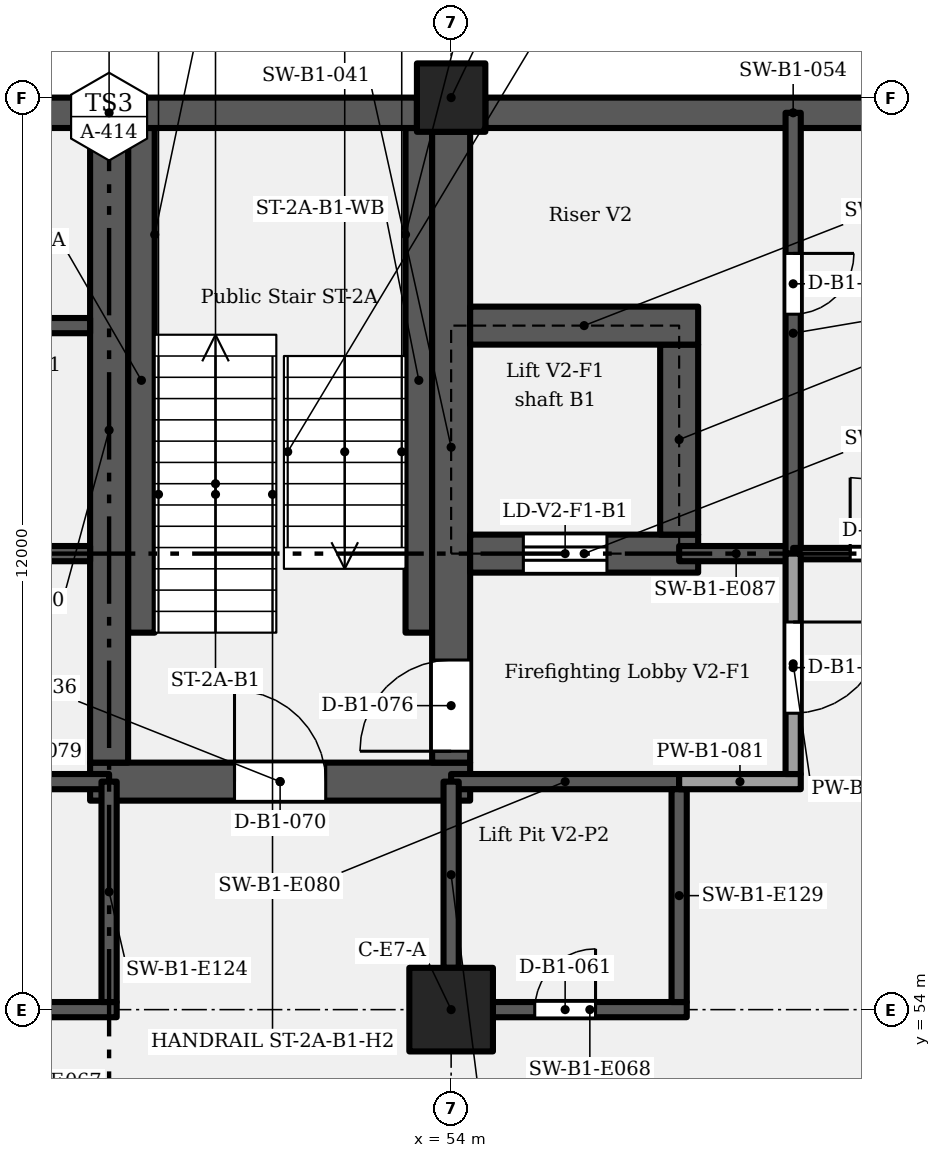
"""IFC4 building model, lengths in metres.
Left out: names, types, materials, properties, quantities, classifications, styles, units other than length and angle.
Written with IfcOpenShell. Run it as: python <this file> out.ifc"""

import sys

from ifc_helpers import new_model, si_unit, direction, frame, frame_2d, origin, origin_2d, place, context, subcontext, project, spatial, rectangle, extrude, element, fill, save


model = new_model("IFC4")
c1 = context("Model", 3, precision=1e-05, world=origin(), true_north=direction((0.0, 1.0)))
c2 = subcontext(c1, "Body", "Model", "MODEL_VIEW")
j1 = project(units=[si_unit("LENGTHUNIT", "METRE"), si_unit("PLANEANGLEUNIT", "RADIAN")], contexts=[c1])
p1 = place(None, origin())
s1 = spatial("IfcSite", under=j1, at=p1, CompositionType="ELEMENT")
p2 = place(p1, origin())
s2 = spatial("IfcBuilding", under=s1, at=p2, CompositionType="ELEMENT")
p3 = place(p2, frame((0.0, 0.0, -4.2)))
s3 = spatial("IfcBuildingStorey", under=s2, at=p3, CompositionType="ELEMENT", Elevation=-4.2)
p4 = place(p3, frame((54.0, 54.0, 0.0), z_axis=(0.0, 0.0, 1.0), x_axis=(1.0, 0.0, 0.0)))
e1 = element("IfcColumn", 1, at=p4, inside=s3, PredefinedType="COLUMN", context=c2, shape_type="SweptSolid", body=[
    extrude(rectangle(XDim=1.1, YDim=1.1, at=origin_2d()), origin(), (0.0, 0.0, 1.0), 4.2),
])
p5 = place(p3, frame((54.0, 66.0, 0.0), z_axis=(0.0, 0.0, 1.0), x_axis=(1.0, 0.0, 0.0)))
e2 = element("IfcColumn", 2, at=p5, inside=s3, PredefinedType="COLUMN", context=c2, shape_type="SweptSolid", body=[
    extrude(rectangle(XDim=0.9, YDim=0.9, at=origin_2d()), origin(), (0.0, 0.0, 1.0), 4.2),
])
p6 = place(p3, frame((49.25, 57.0, 0.0), z_axis=(0.0, 0.0, 1.0), x_axis=(1.0, 0.0, 0.0)))
e3 = element("IfcWall", 3, at=p6, inside=s3, PredefinedType="SHEAR", context=c2, shape_type="SweptSolid", body=[
    extrude(rectangle(XDim=5.0, YDim=0.5, at=frame_2d((2.5, 0.0))), origin(), (0.0, 0.0, 1.0), 3.9),
])
p7 = place(p6, frame((1.9, 0.0, 0.0)))
e4 = element("IfcOpeningElement", 4, at=p7, cuts=e3, PredefinedType="OPENING", context=c2, shape_type="SweptSolid", body=[
    extrude(rectangle(XDim=1.2, YDim=2.1, at=frame_2d((0.6, 1.05))), frame((0.0, 0.26, 0.0), z_axis=(0.0, -1.0, 0.0), x_axis=(1.0, 0.0, 0.0)), (0.0, 0.0, 1.0), 0.52),
])
p8 = place(p3, frame((49.5, 57.25, 0.0), z_axis=(0.0, 0.0, 1.0), x_axis=(0.0, 1.0, 0.0)))
e5 = element("IfcWall", 5, at=p8, inside=s3, PredefinedType="SHEAR", context=c2, shape_type="SweptSolid", body=[
    extrude(rectangle(XDim=8.75, YDim=0.5, at=frame_2d((4.375, 0.0))), origin(), (0.0, 0.0, 1.0), 3.9),
])
p9 = place(p3, frame((54.0, 57.25, 0.0), z_axis=(0.0, 0.0, 1.0), x_axis=(0.0, 1.0, 0.0)))
e6 = element("IfcWall", 6, at=p9, inside=s3, PredefinedType="SHEAR", context=c2, shape_type="SweptSolid", body=[
    extrude(rectangle(XDim=8.3, YDim=0.5, at=frame_2d((4.15, 0.0))), origin(), (0.0, 0.0, 1.0), 3.9),
])
p10 = place(p9, frame((0.15, 0.0, 0.0)))
e7 = element("IfcOpeningElement", 7, at=p10, cuts=e6, PredefinedType="OPENING", context=c2, shape_type="SweptSolid", body=[
    extrude(rectangle(XDim=1.2, YDim=2.1, at=frame_2d((0.6, 1.05))), frame((0.0, 0.26, 0.0), z_axis=(0.0, -1.0, 0.0), x_axis=(1.0, 0.0, 0.0)), (0.0, 0.0, 1.0), 0.52),
])
p11 = place(p3, frame((54.25, 60.0, 0.0), z_axis=(0.0, 0.0, 1.0), x_axis=(1.0, 0.0, 0.0)))
e8 = element("IfcWall", 8, at=p11, inside=s3, PredefinedType="SHEAR", context=c2, shape_type="SweptSolid", body=[
    extrude(rectangle(XDim=3.0, YDim=0.5, at=frame_2d((1.5, 0.0))), origin(), (0.0, 0.0, 1.0), 3.9),
])
p12 = place(p11, frame((0.7, 0.0, 0.0)))
e9 = element("IfcOpeningElement", 9, at=p12, cuts=e8, PredefinedType="OPENING", context=c2, shape_type="SweptSolid", body=[
    extrude(rectangle(XDim=1.1, YDim=2.1, at=frame_2d((0.55, 1.05))), frame((0.0, 0.26, 0.0), z_axis=(0.0, -1.0, 0.0), x_axis=(1.0, 0.0, 0.0)), (0.0, 0.0, 1.0), 0.52),
])
p13 = place(p3, frame((57.0, 60.25, 0.0), z_axis=(0.0, 0.0, 1.0), x_axis=(0.0, 1.0, 0.0)))
e10 = element("IfcWall", 10, at=p13, inside=s3, PredefinedType="SHEAR", context=c2, shape_type="SweptSolid", body=[
    extrude(rectangle(XDim=2.5, YDim=0.5, at=frame_2d((1.25, 0.0))), origin(), (0.0, 0.0, 1.0), 3.9),
])
p14 = place(p3, frame((54.25, 63.0, 0.0), z_axis=(0.0, 0.0, 1.0), x_axis=(1.0, 0.0, 0.0)))
e11 = element("IfcWall", 11, at=p14, inside=s3, PredefinedType="SHEAR", context=c2, shape_type="SweptSolid", body=[
    extrude(rectangle(XDim=3.0, YDim=0.5, at=frame_2d((1.5, 0.0))), origin(), (0.0, 0.0, 1.0), 3.9),
])
for number, where, z_axis, x_axis in (
    (12, (45.45, 65.8, 0.0), (0.0, 0.0, 1.0), (1.0, 0.0, 0.0)),
    (13, (54.45, 65.8, 0.0), (0.0, 0.0, 1.0), (1.0, 0.0, 0.0)),
):
    element("IfcWall", number, at=place(p3, frame(where, z_axis=z_axis, x_axis=x_axis)), inside=s3, PredefinedType="SOLIDWALL", context=c2, shape_type="SweptSolid", body=[
        extrude(rectangle(XDim=8.1, YDim=0.4, at=frame_2d((4.05, 0.0))), origin(), (0.0, 0.0, 1.0), 3.9),
    ])
p15 = place(p3, frame((46.5, 54.0, 0.0), z_axis=(0.0, 0.0, 1.0), x_axis=(1.0, 0.0, 0.0)))
e14 = element("IfcWall", 14, at=p15, inside=s3, PredefinedType="SHEAR", context=c2, shape_type="SweptSolid", body=[
    extrude(rectangle(XDim=3.1, YDim=0.2, at=frame_2d((1.55, 0.0))), origin(), (0.0, 0.0, 1.0), 3.9),
])
p16 = place(p15, frame((1.1, 0.0, 0.0)))
e15 = element("IfcOpeningElement", 15, at=p16, cuts=e14, PredefinedType="OPENING", context=c2, shape_type="SweptSolid", body=[
    extrude(rectangle(XDim=0.8, YDim=2.0, at=frame_2d((0.4, 1.0))), frame((0.0, 0.11, 0.0), z_axis=(0.0, -1.0, 0.0), x_axis=(1.0, 0.0, 0.0)), (0.0, 0.0, 1.0), 0.22),
])
p17 = place(p3, frame((54.55, 54.0, 0.0), z_axis=(0.0, 0.0, 1.0), x_axis=(1.0, 0.0, 0.0)))
e16 = element("IfcWall", 16, at=p17, inside=s3, PredefinedType="SHEAR", context=c2, shape_type="SweptSolid", body=[
    extrude(rectangle(XDim=2.55, YDim=0.2, at=frame_2d((1.275, 0.0))), origin(), (0.0, 0.0, 1.0), 3.9),
])
p18 = place(p17, frame((0.55, 0.0, 0.0)))
e17 = element("IfcOpeningElement", 17, at=p18, cuts=e16, PredefinedType="OPENING", context=c2, shape_type="SweptSolid", body=[
    extrude(rectangle(XDim=0.8, YDim=2.0, at=frame_2d((0.4, 1.0))), frame((0.0, 0.11, 0.0), z_axis=(0.0, -1.0, 0.0), x_axis=(1.0, 0.0, 0.0)), (0.0, 0.0, 1.0), 0.22),
])
p19 = place(p3, frame((46.4, 57.0, 0.0), z_axis=(0.0, 0.0, 1.0), x_axis=(1.0, 0.0, 0.0)))
e18 = element("IfcWall", 18, at=p19, inside=s3, PredefinedType="SHEAR", context=c2, shape_type="SweptSolid", body=[
    extrude(rectangle(XDim=3.1, YDim=0.2, at=frame_2d((1.55, 0.0))), origin(), (0.0, 0.0, 1.0), 3.9),
])
p20 = place(p3, frame((54.0, 57.0, 0.0), z_axis=(0.0, 0.0, 1.0), x_axis=(1.0, 0.0, 0.0)))
e19 = element("IfcWall", 19, at=p20, inside=s3, PredefinedType="SHEAR", context=c2, shape_type="SweptSolid", body=[
    extrude(rectangle(XDim=3.0, YDim=0.2, at=frame_2d((1.5, 0.0))), origin(), (0.0, 0.0, 1.0), 3.9),
])
p21 = place(p3, frame((57.0, 57.0, 0.0), z_axis=(0.0, 0.0, 1.0), x_axis=(1.0, 0.0, 0.0)))
e20 = element("IfcWall", 20, at=p21, inside=s3, PredefinedType="PARTITIONING", context=c2, shape_type="SweptSolid", body=[
    extrude(rectangle(XDim=1.6, YDim=0.2, at=frame_2d((0.8, 0.0))), origin(), (0.0, 0.0, 1.0), 3.2),
])
p22 = place(p3, frame((46.4, 60.0, 0.0), z_axis=(0.0, 0.0, 1.0), x_axis=(1.0, 0.0, 0.0)))
e21 = element("IfcWall", 21, at=p22, inside=s3, PredefinedType="SHEAR", context=c2, shape_type="SweptSolid", body=[
    extrude(rectangle(XDim=2.85, YDim=0.2, at=frame_2d((1.425, 0.0))), origin(), (0.0, 0.0, 1.0), 3.9),
])
p23 = place(p3, frame((57.0, 60.0, 0.0), z_axis=(0.0, 0.0, 1.0), x_axis=(1.0, 0.0, 0.0)))
e22 = element("IfcWall", 22, at=p23, inside=s3, PredefinedType="SHEAR", context=c2, shape_type="SweptSolid", body=[
    extrude(rectangle(XDim=1.5, YDim=0.2, at=frame_2d((0.75, 0.0))), origin(), (0.0, 0.0, 1.0), 3.9),
])
p24 = place(p3, frame((58.5, 60.0, 0.0), z_axis=(0.0, 0.0, 1.0), x_axis=(1.0, 0.0, 0.0)))
e23 = element("IfcWall", 23, at=p24, inside=s3, PredefinedType="PARTITIONING", context=c2, shape_type="SweptSolid", body=[
    extrude(rectangle(XDim=2.575, YDim=0.15, at=frame_2d((1.288, 0.0))), origin(), (0.0, 0.0, 1.0), 3.9),
])
p25 = place(p24, frame((0.75, 0.0, 0.0)))
e24 = element("IfcOpeningElement", 24, at=p25, cuts=e23, PredefinedType="OPENING", context=c2, shape_type="SweptSolid", body=[
    extrude(rectangle(XDim=1.0, YDim=2.1, at=frame_2d((0.5, 1.05))), frame((0.0, 0.085, 0.0), z_axis=(0.0, -1.0, 0.0), x_axis=(1.0, 0.0, 0.0)), (0.0, 0.0, 1.0), 0.17),
])
p26 = place(p3, frame((46.4, 63.0, 0.0), z_axis=(0.0, 0.0, 1.0), x_axis=(1.0, 0.0, 0.0)))
e25 = element("IfcWall", 25, at=p26, inside=s3, PredefinedType="SHEAR", context=c2, shape_type="SweptSolid", body=[
    extrude(rectangle(XDim=2.85, YDim=0.2, at=frame_2d((1.425, 0.0))), origin(), (0.0, 0.0, 1.0), 3.9),
])
p27 = place(p3, frame((49.5, 54.1, 0.0), z_axis=(0.0, 0.0, 1.0), x_axis=(0.0, 1.0, 0.0)))
e26 = element("IfcWall", 26, at=p27, inside=s3, PredefinedType="SHEAR", context=c2, shape_type="SweptSolid", body=[
    extrude(rectangle(XDim=2.9, YDim=0.2, at=frame_2d((1.45, 0.0))), origin(), (0.0, 0.0, 1.0), 3.9),
])
p28 = place(p3, frame((54.0, 54.55, 0.0), z_axis=(0.0, 0.0, 1.0), x_axis=(0.0, 1.0, 0.0)))
e27 = element("IfcWall", 27, at=p28, inside=s3, PredefinedType="SHEAR", context=c2, shape_type="SweptSolid", body=[
    extrude(rectangle(XDim=2.45, YDim=0.2, at=frame_2d((1.225, 0.0))), origin(), (0.0, 0.0, 1.0), 3.9),
])
p29 = place(p3, frame((57.0, 54.1, 0.0), z_axis=(0.0, 0.0, 1.0), x_axis=(0.0, 1.0, 0.0)))
e28 = element("IfcWall", 28, at=p29, inside=s3, PredefinedType="SHEAR", context=c2, shape_type="SweptSolid", body=[
    extrude(rectangle(XDim=2.8, YDim=0.2, at=frame_2d((1.4, 0.0))), origin(), (0.0, 0.0, 1.0), 3.9),
])
p30 = place(p3, frame((58.5, 57.1, 0.0), z_axis=(0.0, 0.0, 1.0), x_axis=(0.0, 1.0, 0.0)))
e29 = element("IfcWall", 29, at=p30, inside=s3, PredefinedType="PARTITIONING", context=c2, shape_type="SweptSolid", body=[
    extrude(rectangle(XDim=2.9, YDim=0.2, at=frame_2d((1.45, 0.0))), origin(), (0.0, 0.0, 1.0), 3.2),
])
p31 = place(p30, frame((2.0, 0.0, 0.0), z_axis=(0.0, 0.0, 1.0), x_axis=(-1.0, 0.0, 0.0)))
e30 = element("IfcOpeningElement", 30, at=p31, cuts=e29, PredefinedType="OPENING", context=c2, shape_type="SweptSolid", body=[
    extrude(rectangle(XDim=1.2, YDim=2.1, at=frame_2d((0.6, 1.05))), frame((0.0, 0.11, 0.0), z_axis=(0.0, -1.0, 0.0), x_axis=(1.0, 0.0, 0.0)), (0.0, 0.0, 1.0), 0.22),
])
p32 = place(p3, frame((58.5, 60.0, 0.0), z_axis=(0.0, 0.0, 1.0), x_axis=(0.0, 1.0, 0.0)))
e31 = element("IfcWall", 31, at=p32, inside=s3, PredefinedType="SHEAR", context=c2, shape_type="SweptSolid", body=[
    extrude(rectangle(XDim=5.8, YDim=0.2, at=frame_2d((2.9, 0.0))), origin(), (0.0, 0.0, 1.0), 3.9),
])
p33 = place(p32, frame((3.95, 0.0, 0.0), z_axis=(0.0, 0.0, 1.0), x_axis=(-1.0, 0.0, 0.0)))
e32 = element("IfcOpeningElement", 32, at=p33, cuts=e31, PredefinedType="OPENING", context=c2, shape_type="SweptSolid", body=[
    extrude(rectangle(XDim=0.8, YDim=2.0, at=frame_2d((0.4, 1.0))), frame((0.0, 0.11, 0.0), z_axis=(0.0, -1.0, 0.0), x_axis=(1.0, 0.0, 0.0)), (0.0, 0.0, 1.0), 0.22),
])
for number, where, z_axis, x_axis in (
    (33, (49.925, 58.96, 0.0), (0.0, 0.0, 1.0), (0.0, 1.0, 0.0)),
    (34, (53.575, 58.96, 0.0), (0.0, 0.0, 1.0), (0.0, 1.0, 0.0)),
):
    element("IfcWall", number, at=place(p3, frame(where, z_axis=z_axis, x_axis=x_axis)), inside=s3, PredefinedType="SHEAR", context=c2, shape_type="SweptSolid", body=[
        extrude(rectangle(XDim=6.64, YDim=0.35, at=frame_2d((3.32, 0.0))), origin(), (0.0, 0.0, 1.0), 3.9),
    ])
p34 = place(p25, origin())
e35 = element("IfcDoor", 35, at=p34, inside=s3, OperationType="SINGLE_SWING_LEFT", PredefinedType="DOOR", context=c2, shape_type="SweptSolid", body=[
    extrude(rectangle(XDim=1.0, YDim=2.1, at=frame_2d((0.5, 1.05))), frame((0.0, 0.025, 0.0), z_axis=(0.0, -1.0, 0.0), x_axis=(1.0, 0.0, 0.0)), (0.0, 0.0, 1.0), 0.05),
])
fill(e24, e35)
p35 = place(p33, origin())
e36 = element("IfcDoor", 36, at=p35, inside=s3, OperationType="SINGLE_SWING_LEFT", PredefinedType="DOOR", context=c2, shape_type="SweptSolid", body=[
    extrude(rectangle(XDim=0.8, YDim=2.0, at=frame_2d((0.4, 1.0))), frame((0.0, 0.025, 0.0), z_axis=(0.0, -1.0, 0.0), x_axis=(1.0, 0.0, 0.0)), (0.0, 0.0, 1.0), 0.05),
])
fill(e32, e36)
p36 = place(p18, origin())
e37 = element("IfcDoor", 37, at=p36, inside=s3, OperationType="SINGLE_SWING_RIGHT", PredefinedType="DOOR", context=c2, shape_type="SweptSolid", body=[
    extrude(rectangle(XDim=0.8, YDim=2.0, at=frame_2d((0.4, 1.0))), frame((0.0, 0.025, 0.0), z_axis=(0.0, -1.0, 0.0), x_axis=(1.0, 0.0, 0.0)), (0.0, 0.0, 1.0), 0.05),
])
fill(e17, e37)
p37 = place(p7, origin())
e38 = element("IfcDoor", 38, at=p37, inside=s3, OperationType="SINGLE_SWING_LEFT", PredefinedType="DOOR", context=c2, shape_type="SweptSolid", body=[
    extrude(rectangle(XDim=1.2, YDim=2.1, at=frame_2d((0.6, 1.05))), frame((0.0, 0.025, 0.0), z_axis=(0.0, -1.0, 0.0), x_axis=(1.0, 0.0, 0.0)), (0.0, 0.0, 1.0), 0.05),
])
fill(e4, e38)
p38 = place(p31, origin())
e39 = element("IfcDoor", 39, at=p38, inside=s3, OperationType="SINGLE_SWING_LEFT", PredefinedType="DOOR", context=c2, shape_type="SweptSolid", body=[
    extrude(rectangle(XDim=1.2, YDim=2.1, at=frame_2d((0.6, 1.05))), frame((0.0, 0.025, 0.0), z_axis=(0.0, -1.0, 0.0), x_axis=(1.0, 0.0, 0.0)), (0.0, 0.0, 1.0), 0.05),
])
fill(e30, e39)
p39 = place(p10, origin())
e40 = element("IfcDoor", 40, at=p39, inside=s3, OperationType="SINGLE_SWING_LEFT", PredefinedType="DOOR", context=c2, shape_type="SweptSolid", body=[
    extrude(rectangle(XDim=1.2, YDim=2.1, at=frame_2d((0.6, 1.05))), frame((0.0, 0.025, 0.0), z_axis=(0.0, -1.0, 0.0), x_axis=(1.0, 0.0, 0.0)), (0.0, 0.0, 1.0), 0.05),
])
fill(e7, e40)
p40 = place(p12, origin())
e41 = element("IfcDoor", 41, at=p40, inside=s3, OperationType="SLIDING_TO_LEFT", PredefinedType="DOOR", context=c2, shape_type="SweptSolid", body=[
    extrude(rectangle(XDim=1.1, YDim=2.1, at=frame_2d((0.55, 1.05))), frame((0.0, 0.025, 0.0), z_axis=(0.0, -1.0, 0.0), x_axis=(1.0, 0.0, 0.0)), (0.0, 0.0, 1.0), 0.05),
])
fill(e9, e41)
save(model, sys.argv[1])
